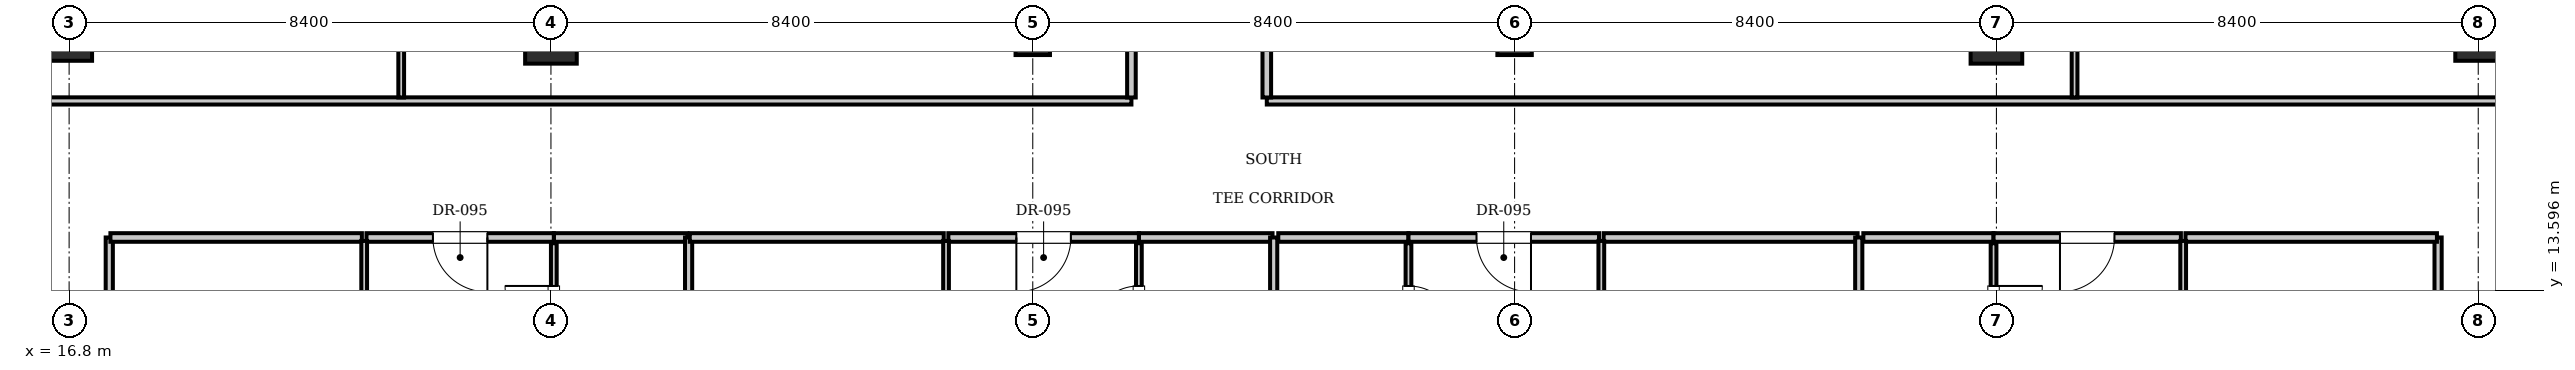
"""IFC4 building model, lengths in metres.
Left out: names, types, materials, properties, quantities, classifications, styles, units other than length and angle.
Written with IfcOpenShell. Run it as: python <this file> out.ifc"""

import sys

from ifc_helpers import new_model, si_unit, direction, frame, frame_2d, origin, origin_2d, place, context, subcontext, project, spatial, rectangle, i_section, extrude, element, fill, save


model = new_model("IFC4")
c1 = context("Model", 3, precision=1e-05, world=origin(), true_north=direction((0.0, 1.0)))
c2 = subcontext(c1, "Body", "Model", "MODEL_VIEW")
j1 = project(units=[si_unit("LENGTHUNIT", "METRE"), si_unit("PLANEANGLEUNIT", "RADIAN")], contexts=[c1])
p1 = place(None, origin())
s1 = spatial("IfcSite", under=j1, at=p1, CompositionType="ELEMENT")
p2 = place(p1, origin())
s2 = spatial("IfcBuilding", under=s1, at=p2, CompositionType="ELEMENT")
p3 = place(p2, frame((0.0, 0.0, 142.8)))
s3 = spatial("IfcBuildingStorey", under=s2, at=p3, CompositionType="ELEMENT", Elevation=142.8)
for number, where, z_axis, x_axis in (
    (1, (25.2, 18.0, 0.0), (0.0, 0.0, 1.0), (1.0, 0.0, 0.0)),
    (2, (50.4, 18.0, 0.0), (0.0, 0.0, 1.0), (1.0, 0.0, 0.0)),
):
    element("IfcColumn", number, at=place(p3, frame(where, z_axis=z_axis, x_axis=x_axis)), inside=s3, PredefinedType="COLUMN", context=c2, shape_type="SweptSolid", body=[
        extrude(rectangle(XDim=0.9, YDim=0.9, at=origin_2d()), origin(), (0.0, 0.0, 1.0), 3.85),
    ])
for number, where, z_axis, x_axis in (
    (3, (33.6, 18.0, 0.0), (0.0, 0.0, 1.0), (1.0, 0.0, 0.0)),
    (4, (42.0, 18.0, 0.0), (0.0, 0.0, 1.0), (1.0, 0.0, 0.0)),
):
    element("IfcColumn", number, at=place(p3, frame(where, z_axis=z_axis, x_axis=x_axis)), inside=s3, PredefinedType="COLUMN", context=c2, shape_type="SweptSolid", body=[
        extrude(i_section(OverallWidth=0.6, OverallDepth=0.6, WebThickness=0.025, FlangeThickness=0.038, at=origin_2d()), origin(), (0.0, 0.0, 1.0), 3.85),
    ])
for number, where, z_axis, x_axis in (
    (5, (16.8, 18.0, 0.0), (0.0, 0.0, 1.0), (1.0, 0.0, 0.0)),
    (6, (58.8, 18.0, 0.0), (0.0, 0.0, 1.0), (1.0, 0.0, 0.0)),
):
    element("IfcColumn", number, at=place(p3, frame(where, z_axis=z_axis, x_axis=x_axis)), inside=s3, PredefinedType="COLUMN", context=c2, shape_type="SweptSolid", body=[
        extrude(rectangle(XDim=0.8, YDim=0.8, at=origin_2d()), origin(), (0.0, 0.0, 1.0), 3.85),
    ])
for number, where, z_axis, x_axis in (
    (7, (17.5, 9.0, 0.0), (0.0, 0.0, 1.0), (0.0, 1.0, 0.0)),
    (8, (58.1, 9.0, 0.0), (0.0, 0.0, 1.0), (0.0, 1.0, 0.0)),
):
    element("IfcWall", number, at=place(p3, frame(where, z_axis=z_axis, x_axis=x_axis)), inside=s3, PredefinedType="PARTITIONING", context=c2, shape_type="SweptSolid", body=[
        extrude(rectangle(XDim=5.52, YDim=0.125, at=frame_2d((2.76, 0.0))), origin(), (0.0, 0.0, 1.0), 3.61),
    ])
p4 = place(p3, frame((25.25, 14.52, 0.0), z_axis=(0.0, 0.0, 1.0), x_axis=(1.0, 0.0, 0.0)))
e9 = element("IfcWall", 9, at=p4, inside=s3, PredefinedType="PARTITIONING", context=c2, shape_type="SweptSolid", body=[
    extrude(rectangle(XDim=2.33, YDim=0.15, at=frame_2d((1.165, 0.0))), origin(), (0.0, 0.0, 1.0), 3.61),
])
p5 = place(p3, frame((25.25, 12.08, 0.0), z_axis=(0.0, 0.0, 1.0), x_axis=(0.0, 1.0, 0.0)))
e10 = element("IfcWall", 10, at=p5, inside=s3, PredefinedType="PARTITIONING", context=c2, shape_type="SweptSolid", body=[
    extrude(rectangle(XDim=2.34, YDim=0.1, at=frame_2d((1.17, 0.0))), origin(), (0.0, 0.0, 1.0), 2.998),
])
p6 = place(p5, frame((0.745, 0.0, 0.0)))
e11 = element("IfcOpeningElement", 11, at=p6, cuts=e10, PredefinedType="OPENING", context=c2, shape_type="SweptSolid", body=[
    extrude(rectangle(XDim=0.85, YDim=2.1, at=frame_2d((0.425, 1.05))), frame((0.0, 0.06, 0.0), z_axis=(0.0, -1.0, 0.0), x_axis=(1.0, 0.0, 0.0)), (0.0, 0.0, 1.0), 0.12),
])
p7 = place(p3, frame((17.52, 14.52, 0.0), z_axis=(0.0, 0.0, 1.0), x_axis=(1.0, 0.0, 0.0)))
e12 = element("IfcWall", 12, at=p7, inside=s3, PredefinedType="PARTITIONING", context=c2, shape_type="SweptSolid", body=[
    extrude(rectangle(XDim=4.384, YDim=0.15, at=frame_2d((2.192, 0.0))), origin(), (0.0, 0.0, 1.0), 3.61),
])
p8 = place(p3, frame((21.984, 14.52, 0.0), z_axis=(0.0, 0.0, 1.0), x_axis=(1.0, 0.0, 0.0)))
e13 = element("IfcWall", 13, at=p8, inside=s3, PredefinedType="PARTITIONING", context=c2, shape_type="SweptSolid", body=[
    extrude(rectangle(XDim=3.266, YDim=0.15, at=frame_2d((1.633, 0.0))), origin(), (0.0, 0.0, 1.0), 3.61),
])
p9 = place(p8, frame((1.158, 0.0, 0.0)))
e14 = element("IfcOpeningElement", 14, at=p9, cuts=e13, PredefinedType="OPENING", context=c2, shape_type="SweptSolid", body=[
    extrude(rectangle(XDim=0.95, YDim=2.15, at=frame_2d((0.475, 1.075))), frame((0.0, 0.085, 0.0), z_axis=(0.0, -1.0, 0.0), x_axis=(1.0, 0.0, 0.0)), (0.0, 0.0, 1.0), 0.17),
])
p10 = place(p3, frame((21.944, 4.63, 0.0), z_axis=(0.0, 0.0, 1.0), x_axis=(0.0, 1.0, 0.0)))
e15 = element("IfcWall", 15, at=p10, inside=s3, PredefinedType="PARTITIONING", context=c2, shape_type="SweptSolid", body=[
    extrude(rectangle(XDim=9.83, YDim=0.1, at=frame_2d((4.915, 0.0))), origin(), (0.0, 0.0, 1.0), 3.61),
])
p11 = place(p10, frame((1.6, 0.0, 0.0)))
e16 = element("IfcOpeningElement", 16, at=p11, cuts=e15, PredefinedType="OPENING", context=c2, shape_type="SweptSolid", body=[
    extrude(rectangle(XDim=0.9, YDim=2.1, at=frame_2d((0.45, 1.05))), frame((0.0, 0.06, 0.0), z_axis=(0.0, -1.0, 0.0), x_axis=(1.0, 0.0, 0.0)), (0.0, 0.0, 1.0), 0.12),
])
p12 = place(p3, frame((27.6, 4.7, 0.0), z_axis=(0.0, 0.0, 1.0), x_axis=(0.0, 1.0, 0.0)))
e17 = element("IfcWall", 17, at=p12, inside=s3, PredefinedType="PARTITIONING", context=c2, shape_type="SweptSolid", body=[
    extrude(rectangle(XDim=9.82, YDim=0.125, at=frame_2d((4.91, 0.0))), origin(), (0.0, 0.0, 1.0), 3.61),
])
p13 = place(p3, frame((35.45, 14.52, 0.0), z_axis=(0.0, 0.0, 1.0), x_axis=(1.0, 0.0, 0.0)))
e18 = element("IfcWall", 18, at=p13, inside=s3, PredefinedType="PARTITIONING", context=c2, shape_type="SweptSolid", body=[
    extrude(rectangle(XDim=2.33, YDim=0.15, at=frame_2d((1.165, 0.0))), origin(), (0.0, 0.0, 1.0), 3.61),
])
p14 = place(p3, frame((35.45, 12.08, 0.0), z_axis=(0.0, 0.0, 1.0), x_axis=(0.0, 1.0, 0.0)))
e19 = element("IfcWall", 19, at=p14, inside=s3, PredefinedType="PARTITIONING", context=c2, shape_type="SweptSolid", body=[
    extrude(rectangle(XDim=2.34, YDim=0.1, at=frame_2d((1.17, 0.0))), origin(), (0.0, 0.0, 1.0), 3.61),
])
p15 = place(p14, frame((0.745, 0.0, 0.0)))
e20 = element("IfcOpeningElement", 20, at=p15, cuts=e19, PredefinedType="OPENING", context=c2, shape_type="SweptSolid", body=[
    extrude(rectangle(XDim=0.85, YDim=2.1, at=frame_2d((0.425, 1.05))), frame((0.0, 0.06, 0.0), z_axis=(0.0, -1.0, 0.0), x_axis=(1.0, 0.0, 0.0)), (0.0, 0.0, 1.0), 0.12),
])
p16 = place(p3, frame((27.62, 14.52, 0.0), z_axis=(0.0, 0.0, 1.0), x_axis=(1.0, 0.0, 0.0)))
e21 = element("IfcWall", 21, at=p16, inside=s3, PredefinedType="PARTITIONING", context=c2, shape_type="SweptSolid", body=[
    extrude(rectangle(XDim=4.428, YDim=0.15, at=frame_2d((2.214, 0.0))), origin(), (0.0, 0.0, 1.0), 3.61),
])
p17 = place(p3, frame((32.128, 14.52, 0.0), z_axis=(0.0, 0.0, 1.0), x_axis=(1.0, 0.0, 0.0)))
e22 = element("IfcWall", 22, at=p17, inside=s3, PredefinedType="PARTITIONING", context=c2, shape_type="SweptSolid", body=[
    extrude(rectangle(XDim=3.322, YDim=0.15, at=frame_2d((1.661, 0.0))), origin(), (0.0, 0.0, 1.0), 3.61),
])
p18 = place(p17, frame((1.186, 0.0, 0.0)))
e23 = element("IfcOpeningElement", 23, at=p18, cuts=e22, PredefinedType="OPENING", context=c2, shape_type="SweptSolid", body=[
    extrude(rectangle(XDim=0.95, YDim=2.15, at=frame_2d((0.475, 1.075))), frame((0.0, 0.085, 0.0), z_axis=(0.0, -1.0, 0.0), x_axis=(1.0, 0.0, 0.0)), (0.0, 0.0, 1.0), 0.17),
])
p19 = place(p3, frame((32.088, 4.63, 0.0), z_axis=(0.0, 0.0, 1.0), x_axis=(0.0, 1.0, 0.0)))
e24 = element("IfcWall", 24, at=p19, inside=s3, PredefinedType="PARTITIONING", context=c2, shape_type="SweptSolid", body=[
    extrude(rectangle(XDim=9.83, YDim=0.1, at=frame_2d((4.915, 0.0))), origin(), (0.0, 0.0, 1.0), 3.61),
])
p20 = place(p19, frame((1.6, 0.0, 0.0)))
e25 = element("IfcOpeningElement", 25, at=p20, cuts=e24, PredefinedType="OPENING", context=c2, shape_type="SweptSolid", body=[
    extrude(rectangle(XDim=0.9, YDim=2.1, at=frame_2d((0.45, 1.05))), frame((0.0, 0.06, 0.0), z_axis=(0.0, -1.0, 0.0), x_axis=(1.0, 0.0, 0.0)), (0.0, 0.0, 1.0), 0.12),
])
p21 = place(p3, frame((37.8, 4.7, 0.0), z_axis=(0.0, 0.0, 1.0), x_axis=(0.0, 1.0, 0.0)))
e26 = element("IfcWall", 26, at=p21, inside=s3, PredefinedType="PARTITIONING", context=c2, shape_type="SweptSolid", body=[
    extrude(rectangle(XDim=9.82, YDim=0.125, at=frame_2d((4.91, 0.0))), origin(), (0.0, 0.0, 1.0), 3.255),
])
p22 = place(p3, frame((37.88, 14.52, 0.0), z_axis=(0.0, 0.0, 1.0), x_axis=(1.0, 0.0, 0.0)))
e27 = element("IfcWall", 27, at=p22, inside=s3, PredefinedType="PARTITIONING", context=c2, shape_type="SweptSolid", body=[
    extrude(rectangle(XDim=2.27, YDim=0.15, at=frame_2d((1.135, 0.0))), origin(), (0.0, 0.0, 1.0), 3.61),
])
p23 = place(p3, frame((40.15, 12.08, 0.0), z_axis=(0.0, 0.0, 1.0), x_axis=(0.0, 1.0, 0.0)))
e28 = element("IfcWall", 28, at=p23, inside=s3, PredefinedType="PARTITIONING", context=c2, shape_type="SweptSolid", body=[
    extrude(rectangle(XDim=2.34, YDim=0.1, at=frame_2d((1.17, 0.0))), origin(), (0.0, 0.0, 1.0), 3.61),
])
p24 = place(p23, frame((0.745, 0.0, 0.0)))
e29 = element("IfcOpeningElement", 29, at=p24, cuts=e28, PredefinedType="OPENING", context=c2, shape_type="SweptSolid", body=[
    extrude(rectangle(XDim=0.85, YDim=2.1, at=frame_2d((0.425, 1.05))), frame((0.0, 0.06, 0.0), z_axis=(0.0, -1.0, 0.0), x_axis=(1.0, 0.0, 0.0)), (0.0, 0.0, 1.0), 0.12),
])
p25 = place(p3, frame((40.15, 14.52, 0.0), z_axis=(0.0, 0.0, 1.0), x_axis=(1.0, 0.0, 0.0)))
e30 = element("IfcWall", 30, at=p25, inside=s3, PredefinedType="PARTITIONING", context=c2, shape_type="SweptSolid", body=[
    extrude(rectangle(XDim=3.322, YDim=0.15, at=frame_2d((1.661, 0.0))), origin(), (0.0, 0.0, 1.0), 3.61),
])
p26 = place(p25, frame((1.186, 0.0, 0.0)))
e31 = element("IfcOpeningElement", 31, at=p26, cuts=e30, PredefinedType="OPENING", context=c2, shape_type="SweptSolid", body=[
    extrude(rectangle(XDim=0.95, YDim=2.15, at=frame_2d((0.475, 1.075))), frame((0.0, 0.085, 0.0), z_axis=(0.0, -1.0, 0.0), x_axis=(1.0, 0.0, 0.0)), (0.0, 0.0, 1.0), 0.17),
])
p27 = place(p3, frame((43.552, 14.52, 0.0), z_axis=(0.0, 0.0, 1.0), x_axis=(1.0, 0.0, 0.0)))
e32 = element("IfcWall", 32, at=p27, inside=s3, PredefinedType="PARTITIONING", context=c2, shape_type="SweptSolid", body=[
    extrude(rectangle(XDim=4.428, YDim=0.15, at=frame_2d((2.214, 0.0))), origin(), (0.0, 0.0, 1.0), 3.61),
])
p28 = place(p3, frame((43.512, 4.63, 0.0), z_axis=(0.0, 0.0, 1.0), x_axis=(0.0, 1.0, 0.0)))
e33 = element("IfcWall", 33, at=p28, inside=s3, PredefinedType="PARTITIONING", context=c2, shape_type="SweptSolid", body=[
    extrude(rectangle(XDim=9.83, YDim=0.1, at=frame_2d((4.915, 0.0))), origin(), (0.0, 0.0, 1.0), 3.61),
])
p29 = place(p28, frame((1.6, 0.0, 0.0)))
e34 = element("IfcOpeningElement", 34, at=p29, cuts=e33, PredefinedType="OPENING", context=c2, shape_type="SweptSolid", body=[
    extrude(rectangle(XDim=0.9, YDim=2.1, at=frame_2d((0.45, 1.05))), frame((0.0, 0.06, 0.0), z_axis=(0.0, -1.0, 0.0), x_axis=(1.0, 0.0, 0.0)), (0.0, 0.0, 1.0), 0.12),
])
p30 = place(p3, frame((48.0, 4.7, 0.0), z_axis=(0.0, 0.0, 1.0), x_axis=(0.0, 1.0, 0.0)))
e35 = element("IfcWall", 35, at=p30, inside=s3, PredefinedType="PARTITIONING", context=c2, shape_type="SweptSolid", body=[
    extrude(rectangle(XDim=9.82, YDim=0.125, at=frame_2d((4.91, 0.0))), origin(), (0.0, 0.0, 1.0), 3.61),
])
p31 = place(p3, frame((48.08, 14.52, 0.0), z_axis=(0.0, 0.0, 1.0), x_axis=(1.0, 0.0, 0.0)))
e36 = element("IfcWall", 36, at=p31, inside=s3, PredefinedType="PARTITIONING", context=c2, shape_type="SweptSolid", body=[
    extrude(rectangle(XDim=2.27, YDim=0.15, at=frame_2d((1.135, 0.0))), origin(), (0.0, 0.0, 1.0), 3.61),
])
p32 = place(p3, frame((50.35, 12.08, 0.0), z_axis=(0.0, 0.0, 1.0), x_axis=(0.0, 1.0, 0.0)))
e37 = element("IfcWall", 37, at=p32, inside=s3, PredefinedType="PARTITIONING", context=c2, shape_type="SweptSolid", body=[
    extrude(rectangle(XDim=2.34, YDim=0.1, at=frame_2d((1.17, 0.0))), origin(), (0.0, 0.0, 1.0), 2.998),
])
p33 = place(p32, frame((0.745, 0.0, 0.0)))
e38 = element("IfcOpeningElement", 38, at=p33, cuts=e37, PredefinedType="OPENING", context=c2, shape_type="SweptSolid", body=[
    extrude(rectangle(XDim=0.85, YDim=2.1, at=frame_2d((0.425, 1.05))), frame((0.0, 0.06, 0.0), z_axis=(0.0, -1.0, 0.0), x_axis=(1.0, 0.0, 0.0)), (0.0, 0.0, 1.0), 0.12),
])
p34 = place(p3, frame((50.35, 14.52, 0.0), z_axis=(0.0, 0.0, 1.0), x_axis=(1.0, 0.0, 0.0)))
e39 = element("IfcWall", 39, at=p34, inside=s3, PredefinedType="PARTITIONING", context=c2, shape_type="SweptSolid", body=[
    extrude(rectangle(XDim=3.266, YDim=0.15, at=frame_2d((1.633, 0.0))), origin(), (0.0, 0.0, 1.0), 3.61),
])
p35 = place(p34, frame((1.158, 0.0, 0.0)))
e40 = element("IfcOpeningElement", 40, at=p35, cuts=e39, PredefinedType="OPENING", context=c2, shape_type="SweptSolid", body=[
    extrude(rectangle(XDim=0.95, YDim=2.15, at=frame_2d((0.475, 1.075))), frame((0.0, 0.085, 0.0), z_axis=(0.0, -1.0, 0.0), x_axis=(1.0, 0.0, 0.0)), (0.0, 0.0, 1.0), 0.17),
])
p36 = place(p3, frame((53.696, 14.52, 0.0), z_axis=(0.0, 0.0, 1.0), x_axis=(1.0, 0.0, 0.0)))
e41 = element("IfcWall", 41, at=p36, inside=s3, PredefinedType="PARTITIONING", context=c2, shape_type="SweptSolid", body=[
    extrude(rectangle(XDim=4.384, YDim=0.15, at=frame_2d((2.192, 0.0))), origin(), (0.0, 0.0, 1.0), 3.61),
])
p37 = place(p3, frame((53.656, 4.63, 0.0), z_axis=(0.0, 0.0, 1.0), x_axis=(0.0, 1.0, 0.0)))
e42 = element("IfcWall", 42, at=p37, inside=s3, PredefinedType="PARTITIONING", context=c2, shape_type="SweptSolid", body=[
    extrude(rectangle(XDim=9.83, YDim=0.1, at=frame_2d((4.915, 0.0))), origin(), (0.0, 0.0, 1.0), 3.61),
])
p38 = place(p37, frame((1.6, 0.0, 0.0)))
e43 = element("IfcOpeningElement", 43, at=p38, cuts=e42, PredefinedType="OPENING", context=c2, shape_type="SweptSolid", body=[
    extrude(rectangle(XDim=0.9, YDim=2.1, at=frame_2d((0.45, 1.05))), frame((0.0, 0.06, 0.0), z_axis=(0.0, -1.0, 0.0), x_axis=(1.0, 0.0, 0.0)), (0.0, 0.0, 1.0), 0.12),
])
p39 = place(p3, frame((13.2, 16.9, 0.0), z_axis=(0.0, 0.0, 1.0), x_axis=(1.0, 0.0, 0.0)))
e44 = element("IfcWall", 44, at=p39, inside=s3, PredefinedType="PARTITIONING", context=c2, shape_type="SweptSolid", body=[
    extrude(rectangle(XDim=22.12, YDim=0.125, at=frame_2d((11.06, 0.0))), origin(), (0.0, 0.0, 1.0), 3.61),
])
p40 = place(p3, frame((37.68, 16.9, 0.0), z_axis=(0.0, 0.0, 1.0), x_axis=(1.0, 0.0, 0.0)))
e45 = element("IfcWall", 45, at=p40, inside=s3, PredefinedType="PARTITIONING", context=c2, shape_type="SweptSolid", body=[
    extrude(rectangle(XDim=24.72, YDim=0.125, at=frame_2d((12.36, 0.0))), origin(), (0.0, 0.0, 1.0), 3.61),
])
p41 = place(p3, frame((35.32, 16.96, 0.0), z_axis=(0.0, 0.0, 1.0), x_axis=(0.0, 1.0, 0.0)))
e46 = element("IfcWall", 46, at=p41, inside=s3, PredefinedType="PARTITIONING", context=c2, shape_type="SweptSolid", body=[
    extrude(rectangle(XDim=2.72, YDim=0.15, at=frame_2d((1.36, 0.0))), origin(), (0.0, 0.0, 1.0), 3.61),
])
p42 = place(p41, frame((0.885, 0.0, 0.0)))
e47 = element("IfcOpeningElement", 47, at=p42, cuts=e46, PredefinedType="OPENING", context=c2, shape_type="SweptSolid", body=[
    extrude(rectangle(XDim=0.95, YDim=2.15, at=frame_2d((0.475, 1.075))), frame((0.0, 0.085, 0.0), z_axis=(0.0, -1.0, 0.0), x_axis=(1.0, 0.0, 0.0)), (0.0, 0.0, 1.0), 0.17),
])
p43 = place(p3, frame((22.59, 16.96, 0.0), z_axis=(0.0, 0.0, 1.0), x_axis=(0.0, 1.0, 0.0)))
e48 = element("IfcWall", 48, at=p43, inside=s3, PredefinedType="PARTITIONING", context=c2, shape_type="SweptSolid", body=[
    extrude(rectangle(XDim=4.61, YDim=0.1, at=frame_2d((2.305, 0.0))), origin(), (0.0, 0.0, 1.0), 3.61),
])
p44 = place(p43, frame((1.855, 0.0, 0.0)))
e49 = element("IfcOpeningElement", 49, at=p44, cuts=e48, PredefinedType="OPENING", context=c2, shape_type="SweptSolid", body=[
    extrude(rectangle(XDim=0.9, YDim=2.1, at=frame_2d((0.45, 1.05))), frame((0.0, 0.06, 0.0), z_axis=(0.0, -1.0, 0.0), x_axis=(1.0, 0.0, 0.0)), (0.0, 0.0, 1.0), 0.12),
])
p45 = place(p3, frame((37.68, 16.96, 0.0), z_axis=(0.0, 0.0, 1.0), x_axis=(0.0, 1.0, 0.0)))
e50 = element("IfcWall", 50, at=p45, inside=s3, PredefinedType="PARTITIONING", context=c2, shape_type="SweptSolid", body=[
    extrude(rectangle(XDim=2.72, YDim=0.15, at=frame_2d((1.36, 0.0))), origin(), (0.0, 0.0, 1.0), 3.304),
])
p46 = place(p45, frame((0.885, 0.0, 0.0)))
e51 = element("IfcOpeningElement", 51, at=p46, cuts=e50, PredefinedType="OPENING", context=c2, shape_type="SweptSolid", body=[
    extrude(rectangle(XDim=0.95, YDim=2.15, at=frame_2d((0.475, 1.075))), frame((0.0, 0.085, 0.0), z_axis=(0.0, -1.0, 0.0), x_axis=(1.0, 0.0, 0.0)), (0.0, 0.0, 1.0), 0.17),
])
p47 = place(p3, frame((51.762, 16.96, 0.0), z_axis=(0.0, 0.0, 1.0), x_axis=(0.0, 1.0, 0.0)))
e52 = element("IfcWall", 52, at=p47, inside=s3, PredefinedType="PARTITIONING", context=c2, shape_type="SweptSolid", body=[
    extrude(rectangle(XDim=4.61, YDim=0.1, at=frame_2d((2.305, 0.0))), origin(), (0.0, 0.0, 1.0), 3.61),
])
p48 = place(p47, frame((1.855, 0.0, 0.0)))
e53 = element("IfcOpeningElement", 53, at=p48, cuts=e52, PredefinedType="OPENING", context=c2, shape_type="SweptSolid", body=[
    extrude(rectangle(XDim=0.9, YDim=2.1, at=frame_2d((0.45, 1.05))), frame((0.0, 0.06, 0.0), z_axis=(0.0, -1.0, 0.0), x_axis=(1.0, 0.0, 0.0)), (0.0, 0.0, 1.0), 0.12),
])
p49 = place(p6, origin())
e54 = element("IfcDoor", 54, at=p49, inside=s3, OperationType="SINGLE_SWING_RIGHT", PredefinedType="DOOR", context=c2, shape_type="SweptSolid", body=[
    extrude(rectangle(XDim=0.85, YDim=2.1, at=frame_2d((0.425, 1.05))), frame((0.0, 0.025, 0.0), z_axis=(0.0, -1.0, 0.0), x_axis=(1.0, 0.0, 0.0)), (0.0, 0.0, 1.0), 0.05),
])
fill(e11, e54)
p50 = place(p9, frame((0.95, 0.0, 0.0), z_axis=(0.0, 0.0, 1.0), x_axis=(-1.0, 0.0, 0.0)))
e55 = element("IfcDoor", 55, at=p50, inside=s3, OperationType="SINGLE_SWING_LEFT", PredefinedType="DOOR", context=c2, shape_type="SweptSolid", body=[
    extrude(rectangle(XDim=0.95, YDim=2.15, at=frame_2d((0.475, 1.075))), frame((0.0, 0.025, 0.0), z_axis=(0.0, -1.0, 0.0), x_axis=(1.0, 0.0, 0.0)), (0.0, 0.0, 1.0), 0.05),
])
fill(e14, e55)
p51 = place(p15, origin())
e56 = element("IfcDoor", 56, at=p51, inside=s3, OperationType="SINGLE_SWING_LEFT", PredefinedType="DOOR", context=c2, shape_type="SweptSolid", body=[
    extrude(rectangle(XDim=0.85, YDim=2.1, at=frame_2d((0.425, 1.05))), frame((0.0, 0.025, 0.0), z_axis=(0.0, -1.0, 0.0), x_axis=(1.0, 0.0, 0.0)), (0.0, 0.0, 1.0), 0.05),
])
fill(e20, e56)
p52 = place(p18, frame((0.95, 0.0, 0.0), z_axis=(0.0, 0.0, 1.0), x_axis=(-1.0, 0.0, 0.0)))
e57 = element("IfcDoor", 57, at=p52, inside=s3, OperationType="SINGLE_SWING_RIGHT", PredefinedType="DOOR", context=c2, shape_type="SweptSolid", body=[
    extrude(rectangle(XDim=0.95, YDim=2.15, at=frame_2d((0.475, 1.075))), frame((0.0, 0.025, 0.0), z_axis=(0.0, -1.0, 0.0), x_axis=(1.0, 0.0, 0.0)), (0.0, 0.0, 1.0), 0.05),
])
fill(e23, e57)
p53 = place(p24, frame((0.85, 0.0, 0.0), z_axis=(0.0, 0.0, 1.0), x_axis=(-1.0, 0.0, 0.0)))
e58 = element("IfcDoor", 58, at=p53, inside=s3, OperationType="SINGLE_SWING_RIGHT", PredefinedType="DOOR", context=c2, shape_type="SweptSolid", body=[
    extrude(rectangle(XDim=0.85, YDim=2.1, at=frame_2d((0.425, 1.05))), frame((0.0, 0.025, 0.0), z_axis=(0.0, -1.0, 0.0), x_axis=(1.0, 0.0, 0.0)), (0.0, 0.0, 1.0), 0.05),
])
fill(e29, e58)
p54 = place(p26, frame((0.95, 0.0, 0.0), z_axis=(0.0, 0.0, 1.0), x_axis=(-1.0, 0.0, 0.0)))
e59 = element("IfcDoor", 59, at=p54, inside=s3, OperationType="SINGLE_SWING_LEFT", PredefinedType="DOOR", context=c2, shape_type="SweptSolid", body=[
    extrude(rectangle(XDim=0.95, YDim=2.15, at=frame_2d((0.475, 1.075))), frame((0.0, 0.025, 0.0), z_axis=(0.0, -1.0, 0.0), x_axis=(1.0, 0.0, 0.0)), (0.0, 0.0, 1.0), 0.05),
])
fill(e31, e59)
p55 = place(p33, frame((0.85, 0.0, 0.0), z_axis=(0.0, 0.0, 1.0), x_axis=(-1.0, 0.0, 0.0)))
e60 = element("IfcDoor", 60, at=p55, inside=s3, OperationType="SINGLE_SWING_LEFT", PredefinedType="DOOR", context=c2, shape_type="SweptSolid", body=[
    extrude(rectangle(XDim=0.85, YDim=2.1, at=frame_2d((0.425, 1.05))), frame((0.0, 0.025, 0.0), z_axis=(0.0, -1.0, 0.0), x_axis=(1.0, 0.0, 0.0)), (0.0, 0.0, 1.0), 0.05),
])
fill(e38, e60)
p56 = place(p35, frame((0.95, 0.0, 0.0), z_axis=(0.0, 0.0, 1.0), x_axis=(-1.0, 0.0, 0.0)))
e61 = element("IfcDoor", 61, at=p56, inside=s3, OperationType="SINGLE_SWING_RIGHT", PredefinedType="DOOR", context=c2, shape_type="SweptSolid", body=[
    extrude(rectangle(XDim=0.95, YDim=2.15, at=frame_2d((0.475, 1.075))), frame((0.0, 0.025, 0.0), z_axis=(0.0, -1.0, 0.0), x_axis=(1.0, 0.0, 0.0)), (0.0, 0.0, 1.0), 0.05),
])
fill(e40, e61)
save(model, sys.argv[1])
